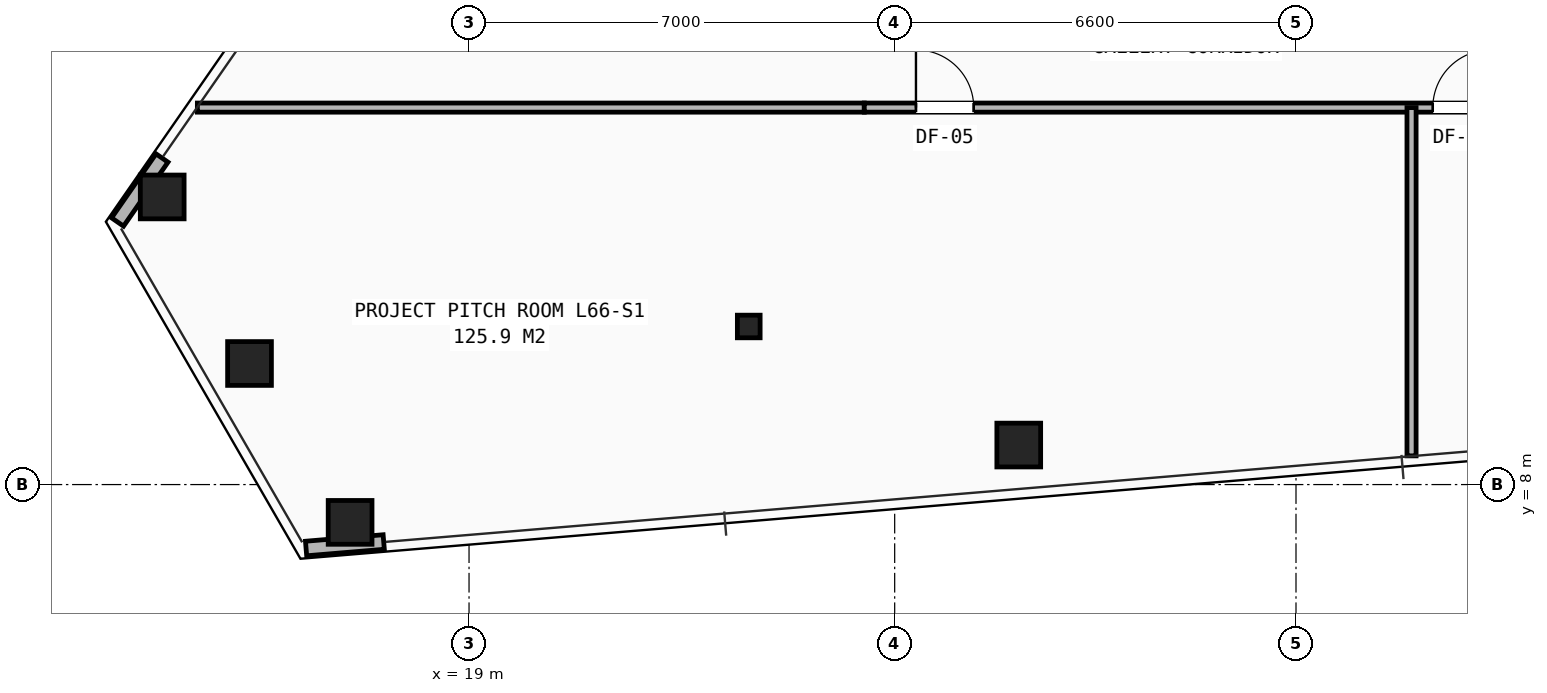
"""IFC4 building model, lengths in metres.
Left out: names, types, materials, properties, quantities, classifications, styles, units other than length and angle.
Written with IfcOpenShell. Run it as: python <this file> out.ifc"""

import sys

from ifc_helpers import new_model, si_unit, direction, frame, frame_2d, origin, origin_2d, place, context, subcontext, project, spatial, rectangle, hollow_rectangle, i_section, extrude, element, fill, save


model = new_model("IFC4")
c1 = context("Model", 3, precision=1e-05, world=origin(), true_north=direction((0.0, 1.0)))
c2 = subcontext(c1, "Body", "Model", "MODEL_VIEW")
j1 = project(units=[si_unit("LENGTHUNIT", "METRE"), si_unit("PLANEANGLEUNIT", "RADIAN")], contexts=[c1])
p1 = place(None, origin())
s1 = spatial("IfcSite", under=j1, at=p1, CompositionType="ELEMENT")
p2 = place(p1, origin())
s2 = spatial("IfcBuilding", under=s1, at=p2, CompositionType="ELEMENT")
p3 = place(p2, frame((0.0, 0.0, 232.9)))
s3 = spatial("IfcBuildingStorey", under=s2, at=p3, CompositionType="ELEMENT", Elevation=232.9)
p4 = place(p3, frame((23.6, 10.6, 0.0), z_axis=(0.0, 0.0, 1.0), x_axis=(1.0, 0.0, 0.0)))
e1 = element("IfcColumn", 1, at=p4, inside=s3, PredefinedType="COLUMN", context=c2, shape_type="SweptSolid", body=[
    extrude(i_section(OverallWidth=0.374, OverallDepth=0.372, WebThickness=0.016, FlangeThickness=0.026, at=origin_2d()), origin(), (0.0, 0.0, 1.0), 3.5),
])
for number, where, z_axis, x_axis in (
    (2, (13.954, 12.73, 0.0), (0.0, 0.0, 1.0), (1.0, 0.0, 0.0)),
    (3, (15.39, 9.991, 0.0), (0.0, 0.0, 1.0), (1.0, 0.0, 0.0)),
    (4, (17.044, 7.378, 0.0), (0.0, 0.0, 1.0), (1.0, 0.0, 0.0)),
    (5, (28.041, 8.65, 0.0), (0.0, 0.0, 1.0), (1.0, 0.0, 0.0)),
):
    element("IfcColumn", number, at=place(p3, frame(where, z_axis=z_axis, x_axis=x_axis)), inside=s3, PredefinedType="COLUMN", context=c2, shape_type="SweptSolid", body=[
        extrude(hollow_rectangle(XDim=0.72, YDim=0.72, WallThickness=0.05, at=origin_2d()), origin(), (0.0, 0.0, 1.0), 3.5),
    ])
p5 = place(p3, frame((13.95, 13.371, 0.0), z_axis=(0.0, 0.0, 1.0), x_axis=(-0.5703386897, -0.821409629254, 0.0)))
e6 = element("IfcWall", 6, at=p5, inside=s3, PredefinedType="SHEAR", context=c2, shape_type="SweptSolid", body=[
    extrude(rectangle(XDim=1.282, YDim=0.24, at=frame_2d((0.641, 0.0))), origin(), (0.0, 0.0, 1.0), 2.623),
])
p6 = place(p3, frame((16.32, 6.948, 0.0), z_axis=(0.0, 0.0, 1.0), x_axis=(0.996527336769, 0.083266242097, 0.0)))
e7 = element("IfcWall", 7, at=p6, inside=s3, PredefinedType="SHEAR", context=c2, shape_type="SweptSolid", body=[
    extrude(rectangle(XDim=1.281, YDim=0.24, at=frame_2d((0.641, 0.0))), origin(), (0.0, 0.0, 1.0), 2.623),
])
p7 = place(p3, frame((14.532, 14.2, 0.0), z_axis=(0.0, 0.0, 1.0), x_axis=(1.0, 0.0, 0.0)))
e8 = element("IfcWall", 8, at=p7, inside=s3, PredefinedType="PARTITIONING", context=c2, shape_type="SweptSolid", body=[
    extrude(rectangle(XDim=10.968, YDim=0.15, at=frame_2d((5.484, 0.0))), origin(), (0.0, 0.0, 1.0), 2.265),
])
p8 = place(p3, frame((25.5, 14.2, 0.0), z_axis=(0.0, 0.0, 1.0), x_axis=(1.0, 0.0, 0.0)))
e9 = element("IfcWall", 9, at=p8, inside=s3, PredefinedType="PARTITIONING", context=c2, shape_type="SweptSolid", body=[
    extrude(rectangle(XDim=29.0, YDim=0.15, at=frame_2d((14.5, 0.0))), origin(), (0.0, 0.0, 1.0), 2.265),
])
p9 = place(p8, frame((0.85, 0.0, 0.0)))
e10 = element("IfcOpeningElement", 10, at=p9, cuts=e9, PredefinedType="OPENING", context=c2, shape_type="SweptSolid", body=[
    extrude(rectangle(XDim=0.95, YDim=2.1, at=frame_2d((0.475, 1.05))), frame((0.0, 0.085, 0.0), z_axis=(0.0, -1.0, 0.0), x_axis=(1.0, 0.0, 0.0)), (0.0, 0.0, 1.0), 0.17),
])
p10 = place(p8, frame((9.35, 0.0, 0.0)))
e11 = element("IfcOpeningElement", 11, at=p10, cuts=e9, PredefinedType="OPENING", context=c2, shape_type="SweptSolid", body=[
    extrude(rectangle(XDim=0.95, YDim=2.1, at=frame_2d((0.475, 1.05))), frame((0.0, 0.085, 0.0), z_axis=(0.0, -1.0, 0.0), x_axis=(1.0, 0.0, 0.0)), (0.0, 0.0, 1.0), 0.17),
])
p11 = place(p8, frame((16.05, 0.0, 0.0)))
e12 = element("IfcOpeningElement", 12, at=p11, cuts=e9, PredefinedType="OPENING", context=c2, shape_type="SweptSolid", body=[
    extrude(rectangle(XDim=0.95, YDim=2.1, at=frame_2d((0.475, 1.05))), frame((0.0, 0.085, 0.0), z_axis=(0.0, -1.0, 0.0), x_axis=(1.0, 0.0, 0.0)), (0.0, 0.0, 1.0), 0.17),
])
p12 = place(p3, frame((34.5, 8.472, 0.0), z_axis=(0.0, 0.0, 1.0), x_axis=(0.0, 1.0, 0.0)))
e13 = element("IfcWall", 13, at=p12, inside=s3, PredefinedType="PARTITIONING", context=c2, shape_type="SweptSolid", body=[
    extrude(rectangle(XDim=5.728, YDim=0.15, at=frame_2d((2.864, 0.0))), origin(), (0.0, 0.0, 1.0), 2.265),
])
p13 = place(p9, origin())
e14 = element("IfcDoor", 14, at=p13, inside=s3, OperationType="SINGLE_SWING_LEFT", PredefinedType="DOOR", context=c2, shape_type="SweptSolid", body=[
    extrude(rectangle(XDim=0.95, YDim=2.1, at=frame_2d((0.475, 1.05))), frame((0.0, 0.025, 0.0), z_axis=(0.0, -1.0, 0.0), x_axis=(1.0, 0.0, 0.0)), (0.0, 0.0, 1.0), 0.05),
])
fill(e10, e14)
p14 = place(p10, origin())
e15 = element("IfcDoor", 15, at=p14, inside=s3, OperationType="SINGLE_SWING_RIGHT", PredefinedType="DOOR", context=c2, shape_type="SweptSolid", body=[
    extrude(rectangle(XDim=0.95, YDim=2.1, at=frame_2d((0.475, 1.05))), frame((0.0, 0.025, 0.0), z_axis=(0.0, -1.0, 0.0), x_axis=(1.0, 0.0, 0.0)), (0.0, 0.0, 1.0), 0.05),
])
fill(e11, e15)
save(model, sys.argv[1])
